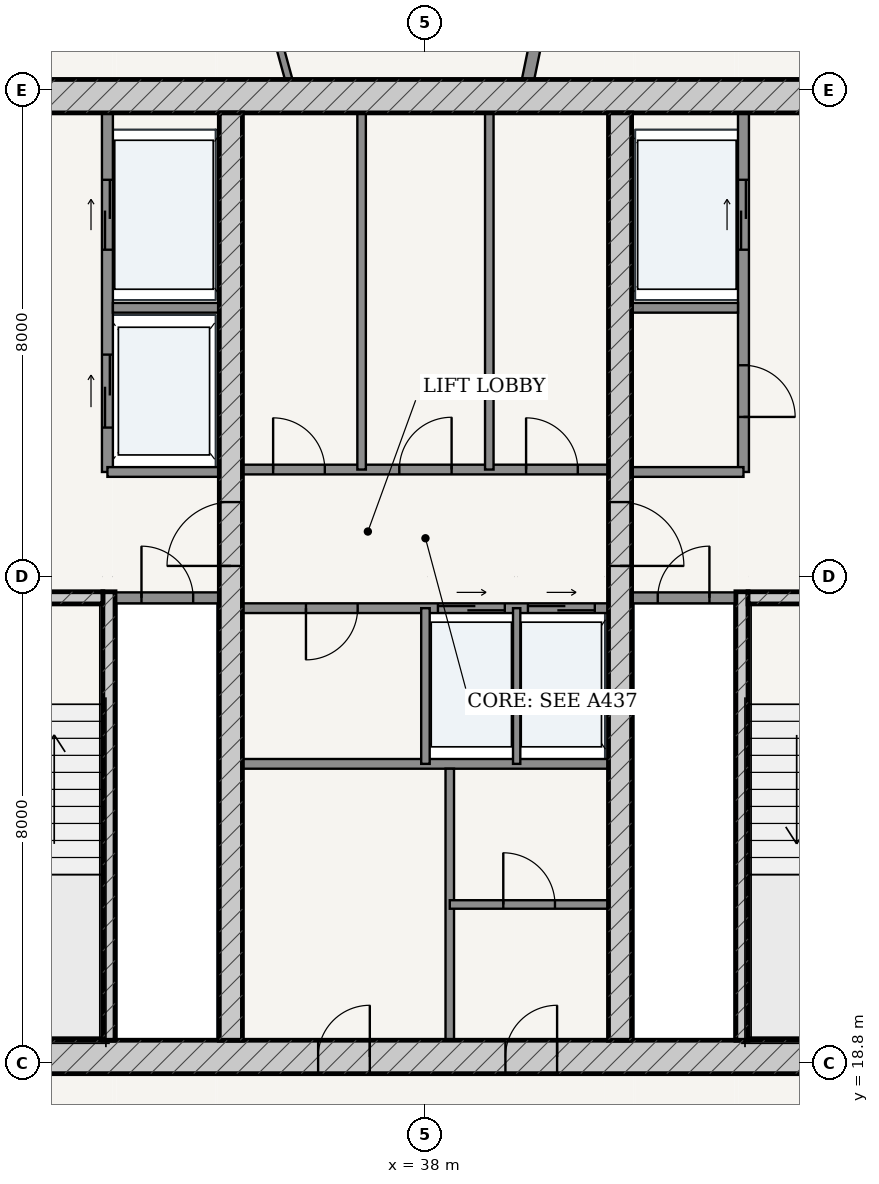
"""IFC4 building model, lengths in metres.
Left out: names, types, materials, properties, quantities, classifications, styles, units other than length and angle.
Written with IfcOpenShell. Run it as: python <this file> out.ifc"""

import sys

from ifc_helpers import new_model, si_unit, direction, frame, frame_2d, origin, place, context, subcontext, project, spatial, rectangle, extrude, source, transform, mapped, element, fill, save


model = new_model("IFC4")
c1 = context("Model", 3, precision=1e-05, world=origin(), true_north=direction((-0.2419218956, 0.970295726276)))
c2 = subcontext(c1, "Body", "Model", "MODEL_VIEW")
j1 = project(units=[si_unit("LENGTHUNIT", "METRE"), si_unit("PLANEANGLEUNIT", "RADIAN")], contexts=[c1])
p1 = place(None, origin())
s1 = spatial("IfcSite", under=j1, at=p1, CompositionType="ELEMENT")
p2 = place(p1, origin())
s2 = spatial("IfcBuilding", under=s1, at=p2, CompositionType="ELEMENT")
p3 = place(p2, frame((0.0, 0.0, 285.7)))
s3 = spatial("IfcBuildingStorey", under=s2, at=p3, CompositionType="ELEMENT", Elevation=285.7)
p4 = place(p3, frame((28.825, 18.9, 0.0), z_axis=(0.0, 0.0, 1.0), x_axis=(1.0, 0.0, 0.0)))
e1 = element("IfcWall", 1, at=p4, inside=s3, PredefinedType="SHEAR", context=c2, shape_type="SweptSolid", body=[
    extrude(rectangle(XDim=18.35, YDim=0.55, at=frame_2d((9.175, 0.0))), origin(), (0.0, 0.0, 1.0), 3.49),
])
p5 = place(p4, frame((7.41, 0.0, 0.0)))
e2 = element("IfcOpeningElement", 2, at=p5, cuts=e1, PredefinedType="OPENING", context=c2, shape_type="SweptSolid", body=[
    extrude(rectangle(XDim=0.85, YDim=2.1, at=frame_2d((0.425, 1.05))), frame((0.0, 0.285, 0.0), z_axis=(0.0, -1.0, 0.0), x_axis=(1.0, 0.0, 0.0)), (0.0, 0.0, 1.0), 0.57),
])
p6 = place(p4, frame((10.49, 0.0, 0.0)))
e3 = element("IfcOpeningElement", 3, at=p6, cuts=e1, PredefinedType="OPENING", context=c2, shape_type="SweptSolid", body=[
    extrude(rectangle(XDim=0.85, YDim=2.1, at=frame_2d((0.425, 1.05))), frame((0.0, 0.285, 0.0), z_axis=(0.0, -1.0, 0.0), x_axis=(1.0, 0.0, 0.0)), (0.0, 0.0, 1.0), 0.57),
])
p7 = place(p3, frame((28.825, 34.7, 0.0), z_axis=(0.0, 0.0, 1.0), x_axis=(1.0, 0.0, 0.0)))
e4 = element("IfcWall", 4, at=p7, inside=s3, PredefinedType="SHEAR", context=c2, shape_type="SweptSolid", body=[
    extrude(rectangle(XDim=18.35, YDim=0.55, at=frame_2d((9.175, 0.0))), origin(), (0.0, 0.0, 1.0), 3.49),
])
p8 = place(p3, frame((32.795, 19.175, 0.0), z_axis=(0.0, 0.0, 1.0), x_axis=(0.0, 1.0, 0.0)))
e5 = element("IfcWall", 5, at=p8, inside=s3, PredefinedType="SOLIDWALL", context=c2, shape_type="SweptSolid", body=[
    extrude(rectangle(XDim=7.375, YDim=0.2, at=frame_2d((3.688, 0.0))), origin(), (0.0, 0.0, 1.0), 3.49),
])
p9 = place(p3, frame((29.375, 26.45, 0.0), z_axis=(0.0, 0.0, 1.0), x_axis=(1.0, 0.0, 0.0)))
e6 = element("IfcWall", 6, at=p9, inside=s3, PredefinedType="SOLIDWALL", context=c2, shape_type="SweptSolid", body=[
    extrude(rectangle(XDim=3.32, YDim=0.2, at=frame_2d((1.66, 0.0))), origin(), (0.0, 0.0, 1.0), 3.49),
])
p10 = place(p9, frame((1.185, 0.0, 0.0)))
e7 = element("IfcOpeningElement", 7, at=p10, cuts=e6, PredefinedType="OPENING", context=c2, shape_type="SweptSolid", body=[
    extrude(rectangle(XDim=0.95, YDim=2.15, at=frame_2d((0.475, 1.075))), frame((0.0, 0.11, 0.0), z_axis=(0.0, -1.0, 0.0), x_axis=(1.0, 0.0, 0.0)), (0.0, 0.0, 1.0), 0.22),
])
p11 = place(p3, frame((43.205, 19.175, 0.0), z_axis=(0.0, 0.0, 1.0), x_axis=(0.0, 1.0, 0.0)))
e8 = element("IfcWall", 8, at=p11, inside=s3, PredefinedType="SOLIDWALL", context=c2, shape_type="SweptSolid", body=[
    extrude(rectangle(XDim=7.375, YDim=0.2, at=frame_2d((3.688, 0.0))), origin(), (0.0, 0.0, 1.0), 3.49),
])
p12 = place(p3, frame((43.305, 26.45, 0.0), z_axis=(0.0, 0.0, 1.0), x_axis=(1.0, 0.0, 0.0)))
e9 = element("IfcWall", 9, at=p12, inside=s3, PredefinedType="SOLIDWALL", context=c2, shape_type="SweptSolid", body=[
    extrude(rectangle(XDim=3.32, YDim=0.2, at=frame_2d((1.66, 0.0))), origin(), (0.0, 0.0, 1.0), 3.49),
])
p13 = place(p12, frame((1.185, 0.0, 0.0)))
e10 = element("IfcOpeningElement", 10, at=p13, cuts=e9, PredefinedType="OPENING", context=c2, shape_type="SweptSolid", body=[
    extrude(rectangle(XDim=0.95, YDim=2.15, at=frame_2d((0.475, 1.075))), frame((0.0, 0.11, 0.0), z_axis=(0.0, -1.0, 0.0), x_axis=(1.0, 0.0, 0.0)), (0.0, 0.0, 1.0), 0.22),
])
p14 = place(p3, frame((34.8, 19.175, 0.0), z_axis=(0.0, 0.0, 1.0), x_axis=(0.0, 1.0, 0.0)))
e11 = element("IfcWall", 11, at=p14, inside=s3, PredefinedType="SHEAR", context=c2, shape_type="SweptSolid", body=[
    extrude(rectangle(XDim=15.25, YDim=0.38, at=frame_2d((7.625, 0.0))), origin(), (0.0, 0.0, 1.0), 3.49),
])
p15 = place(p14, frame((7.8, 0.0, 0.0)))
e12 = element("IfcOpeningElement", 12, at=p15, cuts=e11, PredefinedType="OPENING", context=c2, shape_type="SweptSolid", body=[
    extrude(rectangle(XDim=1.05, YDim=2.15, at=frame_2d((0.525, 1.075))), frame((0.0, 0.2, 0.0), z_axis=(0.0, -1.0, 0.0), x_axis=(1.0, 0.0, 0.0)), (0.0, 0.0, 1.0), 0.4),
])
p16 = place(p3, frame((41.2, 19.175, 0.0), z_axis=(0.0, 0.0, 1.0), x_axis=(0.0, 1.0, 0.0)))
e13 = element("IfcWall", 13, at=p16, inside=s3, PredefinedType="SHEAR", context=c2, shape_type="SweptSolid", body=[
    extrude(rectangle(XDim=15.25, YDim=0.38, at=frame_2d((7.625, 0.0))), origin(), (0.0, 0.0, 1.0), 3.49),
])
p17 = place(p16, frame((7.8, 0.0, 0.0)))
e14 = element("IfcOpeningElement", 14, at=p17, cuts=e13, PredefinedType="OPENING", context=c2, shape_type="SweptSolid", body=[
    extrude(rectangle(XDim=1.05, YDim=2.15, at=frame_2d((0.525, 1.075))), frame((0.0, 0.2, 0.0), z_axis=(0.0, -1.0, 0.0), x_axis=(1.0, 0.0, 0.0)), (0.0, 0.0, 1.0), 0.4),
])
p18 = place(p3, frame((32.9, 26.45, 0.0), z_axis=(0.0, 0.0, 1.0), x_axis=(1.0, 0.0, 0.0)))
e15 = element("IfcWall", 15, at=p18, inside=s3, PredefinedType="PARTITIONING", context=c2, shape_type="SweptSolid", body=[
    extrude(rectangle(XDim=1.71, YDim=0.18, at=frame_2d((0.855, 0.0))), origin(), (0.0, 0.0, 1.0), 3.49),
])
p19 = place(p18, frame((0.43, 0.0, 0.0)))
e16 = element("IfcOpeningElement", 16, at=p19, cuts=e15, PredefinedType="OPENING", context=c2, shape_type="SweptSolid", body=[
    extrude(rectangle(XDim=0.85, YDim=2.1, at=frame_2d((0.425, 1.05))), frame((0.0, 0.1, 0.0), z_axis=(0.0, -1.0, 0.0), x_axis=(1.0, 0.0, 0.0)), (0.0, 0.0, 1.0), 0.2),
])
p20 = place(p3, frame((41.39, 26.45, 0.0), z_axis=(0.0, 0.0, 1.0), x_axis=(1.0, 0.0, 0.0)))
e17 = element("IfcWall", 17, at=p20, inside=s3, PredefinedType="PARTITIONING", context=c2, shape_type="SweptSolid", body=[
    extrude(rectangle(XDim=1.71, YDim=0.18, at=frame_2d((0.855, 0.0))), origin(), (0.0, 0.0, 1.0), 3.49),
])
p21 = place(p20, frame((0.43, 0.0, 0.0)))
e18 = element("IfcOpeningElement", 18, at=p21, cuts=e17, PredefinedType="OPENING", context=c2, shape_type="SweptSolid", body=[
    extrude(rectangle(XDim=0.85, YDim=2.1, at=frame_2d((0.425, 1.05))), frame((0.0, 0.1, 0.0), z_axis=(0.0, -1.0, 0.0), x_axis=(1.0, 0.0, 0.0)), (0.0, 0.0, 1.0), 0.2),
])
p22 = place(p3, frame((32.77, 28.52, 0.0), z_axis=(0.0, 0.0, 1.0), x_axis=(0.0, 1.0, 0.0)))
e19 = element("IfcWall", 19, at=p22, inside=s3, PredefinedType="PARTITIONING", context=c2, shape_type="SweptSolid", body=[
    extrude(rectangle(XDim=5.905, YDim=0.18, at=frame_2d((2.953, 0.0))), origin(), (0.0, 0.0, 1.0), 3.49),
])
p23 = place(p22, frame((3.655, 0.0, 0.0)))
e20 = element("IfcOpeningElement", 20, at=p23, cuts=e19, PredefinedType="OPENING", context=c2, shape_type="SweptSolid", body=[
    extrude(rectangle(XDim=1.15, YDim=2.2, at=frame_2d((0.575, 1.1))), frame((0.0, 0.1, 0.0), z_axis=(0.0, -1.0, 0.0), x_axis=(1.0, 0.0, 0.0)), (0.0, 0.0, 1.0), 0.2),
])
p24 = place(p22, frame((0.73, 0.0, 0.0)))
e21 = element("IfcOpeningElement", 21, at=p24, cuts=e19, PredefinedType="OPENING", context=c2, shape_type="SweptSolid", body=[
    extrude(rectangle(XDim=1.2, YDim=2.25, at=frame_2d((0.6, 1.125))), frame((0.0, 0.1, 0.0), z_axis=(0.0, -1.0, 0.0), x_axis=(1.0, 0.0, 0.0)), (0.0, 0.0, 1.0), 0.2),
])
p25 = place(p3, frame((32.86, 31.22, 0.0), z_axis=(0.0, 0.0, 1.0), x_axis=(1.0, 0.0, 0.0)))
e22 = element("IfcWall", 22, at=p25, inside=s3, PredefinedType="PARTITIONING", context=c2, shape_type="SweptSolid", body=[
    extrude(rectangle(XDim=1.75, YDim=0.16, at=frame_2d((0.875, 0.0))), origin(), (0.0, 0.0, 1.0), 3.49),
])
p26 = place(p3, frame((32.77, 28.52, 0.0), z_axis=(0.0, 0.0, 1.0), x_axis=(1.0, 0.0, 0.0)))
e23 = element("IfcWall", 23, at=p26, inside=s3, PredefinedType="PARTITIONING", context=c2, shape_type="SweptSolid", body=[
    extrude(rectangle(XDim=1.84, YDim=0.16, at=frame_2d((0.92, 0.0))), origin(), (0.0, 0.0, 1.0), 3.49),
])
p27 = place(p3, frame((43.23, 28.52, 0.0), z_axis=(0.0, 0.0, 1.0), x_axis=(0.0, 1.0, 0.0)))
e24 = element("IfcWall", 24, at=p27, inside=s3, PredefinedType="PARTITIONING", context=c2, shape_type="SweptSolid", body=[
    extrude(rectangle(XDim=5.905, YDim=0.18, at=frame_2d((2.953, 0.0))), origin(), (0.0, 0.0, 1.0), 3.49),
])
p28 = place(p27, frame((0.905, 0.0, 0.0)))
e25 = element("IfcOpeningElement", 25, at=p28, cuts=e24, PredefinedType="OPENING", context=c2, shape_type="SweptSolid", body=[
    extrude(rectangle(XDim=0.85, YDim=2.1, at=frame_2d((0.425, 1.05))), frame((0.0, 0.1, 0.0), z_axis=(0.0, -1.0, 0.0), x_axis=(1.0, 0.0, 0.0)), (0.0, 0.0, 1.0), 0.2),
])
p29 = place(p27, frame((3.655, 0.0, 0.0)))
e26 = element("IfcOpeningElement", 26, at=p29, cuts=e24, PredefinedType="OPENING", context=c2, shape_type="SweptSolid", body=[
    extrude(rectangle(XDim=1.15, YDim=2.2, at=frame_2d((0.575, 1.1))), frame((0.0, 0.1, 0.0), z_axis=(0.0, -1.0, 0.0), x_axis=(1.0, 0.0, 0.0)), (0.0, 0.0, 1.0), 0.2),
])
p30 = place(p3, frame((41.39, 31.22, 0.0), z_axis=(0.0, 0.0, 1.0), x_axis=(1.0, 0.0, 0.0)))
e27 = element("IfcWall", 27, at=p30, inside=s3, PredefinedType="PARTITIONING", context=c2, shape_type="SweptSolid", body=[
    extrude(rectangle(XDim=1.75, YDim=0.16, at=frame_2d((0.875, 0.0))), origin(), (0.0, 0.0, 1.0), 3.49),
])
p31 = place(p3, frame((41.39, 28.52, 0.0), z_axis=(0.0, 0.0, 1.0), x_axis=(1.0, 0.0, 0.0)))
e28 = element("IfcWall", 28, at=p31, inside=s3, PredefinedType="PARTITIONING", context=c2, shape_type="SweptSolid", body=[
    extrude(rectangle(XDim=1.84, YDim=0.16, at=frame_2d((0.92, 0.0))), origin(), (0.0, 0.0, 1.0), 3.49),
])
p32 = place(p3, frame((34.99, 28.56, 0.0), z_axis=(0.0, 0.0, 1.0), x_axis=(1.0, 0.0, 0.0)))
e29 = element("IfcWall", 29, at=p32, inside=s3, PredefinedType="PARTITIONING", context=c2, shape_type="SweptSolid", body=[
    extrude(rectangle(XDim=6.02, YDim=0.16, at=frame_2d((3.01, 0.0))), origin(), (0.0, 0.0, 1.0), 3.49),
])
p33 = place(p32, frame((0.505, 0.0, 0.0)))
e30 = element("IfcOpeningElement", 30, at=p33, cuts=e29, PredefinedType="OPENING", context=c2, shape_type="SweptSolid", body=[
    extrude(rectangle(XDim=0.85, YDim=2.1, at=frame_2d((0.425, 1.05))), frame((0.0, 0.09, 0.0), z_axis=(0.0, -1.0, 0.0), x_axis=(1.0, 0.0, 0.0)), (0.0, 0.0, 1.0), 0.18),
])
p34 = place(p32, frame((2.58, 0.0, 0.0)))
e31 = element("IfcOpeningElement", 31, at=p34, cuts=e29, PredefinedType="OPENING", context=c2, shape_type="SweptSolid", body=[
    extrude(rectangle(XDim=0.86, YDim=2.1, at=frame_2d((0.43, 1.05))), frame((0.0, 0.09, 0.0), z_axis=(0.0, -1.0, 0.0), x_axis=(1.0, 0.0, 0.0)), (0.0, 0.0, 1.0), 0.18),
])
p35 = place(p32, frame((4.665, 0.0, 0.0)))
e32 = element("IfcOpeningElement", 32, at=p35, cuts=e29, PredefinedType="OPENING", context=c2, shape_type="SweptSolid", body=[
    extrude(rectangle(XDim=0.85, YDim=2.1, at=frame_2d((0.425, 1.05))), frame((0.0, 0.09, 0.0), z_axis=(0.0, -1.0, 0.0), x_axis=(1.0, 0.0, 0.0)), (0.0, 0.0, 1.0), 0.18),
])
for number, where, z_axis, x_axis in (
    (33, (36.95, 28.56, 0.0), (0.0, 0.0, 1.0), (0.0, 1.0, 0.0)),
    (34, (39.05, 28.56, 0.0), (0.0, 0.0, 1.0), (0.0, 1.0, 0.0)),
):
    element("IfcWall", number, at=place(p3, frame(where, z_axis=z_axis, x_axis=x_axis)), inside=s3, PredefinedType="PARTITIONING", context=c2, shape_type="SweptSolid", body=[
        extrude(rectangle(XDim=5.865, YDim=0.14, at=frame_2d((2.933, 0.0))), origin(), (0.0, 0.0, 1.0), 3.49),
    ])
p36 = place(p3, frame((34.99, 26.28, 0.0), z_axis=(0.0, 0.0, 1.0), x_axis=(1.0, 0.0, 0.0)))
e35 = element("IfcWall", 35, at=p36, inside=s3, PredefinedType="PARTITIONING", context=c2, shape_type="SweptSolid", body=[
    extrude(rectangle(XDim=6.02, YDim=0.16, at=frame_2d((3.01, 0.0))), origin(), (0.0, 0.0, 1.0), 3.49),
])
p37 = place(p36, frame((1.045, 0.0, 0.0)))
e36 = element("IfcOpeningElement", 36, at=p37, cuts=e35, PredefinedType="OPENING", context=c2, shape_type="SweptSolid", body=[
    extrude(rectangle(XDim=0.85, YDim=2.1, at=frame_2d((0.425, 1.05))), frame((0.0, 0.09, 0.0), z_axis=(0.0, -1.0, 0.0), x_axis=(1.0, 0.0, 0.0)), (0.0, 0.0, 1.0), 0.18),
])
p38 = place(p36, frame((3.215, 0.0, 0.0)))
e37 = element("IfcOpeningElement", 37, at=p38, cuts=e35, PredefinedType="OPENING", context=c2, shape_type="SweptSolid", body=[
    extrude(rectangle(XDim=1.1, YDim=2.2, at=frame_2d((0.55, 1.1))), frame((0.0, 0.09, 0.0), z_axis=(0.0, -1.0, 0.0), x_axis=(1.0, 0.0, 0.0)), (0.0, 0.0, 1.0), 0.18),
])
p39 = place(p36, frame((4.695, 0.0, 0.0)))
e38 = element("IfcOpeningElement", 38, at=p39, cuts=e35, PredefinedType="OPENING", context=c2, shape_type="SweptSolid", body=[
    extrude(rectangle(XDim=1.1, YDim=2.2, at=frame_2d((0.55, 1.1))), frame((0.0, 0.09, 0.0), z_axis=(0.0, -1.0, 0.0), x_axis=(1.0, 0.0, 0.0)), (0.0, 0.0, 1.0), 0.18),
])
p40 = place(p3, frame((34.99, 23.72, 0.0), z_axis=(0.0, 0.0, 1.0), x_axis=(1.0, 0.0, 0.0)))
e39 = element("IfcWall", 39, at=p40, inside=s3, PredefinedType="PARTITIONING", context=c2, shape_type="SweptSolid", body=[
    extrude(rectangle(XDim=6.02, YDim=0.16, at=frame_2d((3.01, 0.0))), origin(), (0.0, 0.0, 1.0), 3.49),
])
p41 = place(p3, frame((38.0, 23.72, 0.0), z_axis=(0.0, 0.0, 1.0), x_axis=(0.0, 1.0, 0.0)))
e40 = element("IfcWall", 40, at=p41, inside=s3, PredefinedType="PARTITIONING", context=c2, shape_type="SweptSolid", body=[
    extrude(rectangle(XDim=2.56, YDim=0.14, at=frame_2d((1.28, 0.0))), origin(), (0.0, 0.0, 1.0), 3.49),
])
p42 = place(p3, frame((39.5, 23.72, 0.0), z_axis=(0.0, 0.0, 1.0), x_axis=(0.0, 1.0, 0.0)))
e41 = element("IfcWall", 41, at=p42, inside=s3, PredefinedType="PARTITIONING", context=c2, shape_type="SweptSolid", body=[
    extrude(rectangle(XDim=2.56, YDim=0.12, at=frame_2d((1.28, 0.0))), origin(), (0.0, 0.0, 1.0), 3.49),
])
p43 = place(p3, frame((38.4, 19.175, 0.0), z_axis=(0.0, 0.0, 1.0), x_axis=(0.0, 1.0, 0.0)))
e42 = element("IfcWall", 42, at=p43, inside=s3, PredefinedType="PARTITIONING", context=c2, shape_type="SweptSolid", body=[
    extrude(rectangle(XDim=4.465, YDim=0.14, at=frame_2d((2.232, 0.0))), origin(), (0.0, 0.0, 1.0), 3.49),
])
p44 = place(p3, frame((38.4, 21.407, 0.0), z_axis=(0.0, 0.0, 1.0), x_axis=(1.0, 0.0, 0.0)))
e43 = element("IfcWall", 43, at=p44, inside=s3, PredefinedType="PARTITIONING", context=c2, shape_type="SweptSolid", body=[
    extrude(rectangle(XDim=2.61, YDim=0.14, at=frame_2d((1.305, 0.0))), origin(), (0.0, 0.0, 1.0), 3.49),
])
p45 = place(p44, frame((0.88, 0.0, 0.0)))
e44 = element("IfcOpeningElement", 44, at=p45, cuts=e43, PredefinedType="OPENING", context=c2, shape_type="SweptSolid", body=[
    extrude(rectangle(XDim=0.85, YDim=2.1, at=frame_2d((0.425, 1.05))), frame((0.0, 0.08, 0.0), z_axis=(0.0, -1.0, 0.0), x_axis=(1.0, 0.0, 0.0)), (0.0, 0.0, 1.0), 0.16),
])
p46 = place(p3, frame((39.688, 34.977, 0.0), z_axis=(0.0, 0.0, 1.0), x_axis=(0.202091890364, 0.979366564596, 0.0)))
e45 = element("IfcWall", 45, at=p46, inside=s3, PredefinedType="PARTITIONING", context=c2, shape_type="SweptSolid", body=[
    extrude(rectangle(XDim=10.278, YDim=0.2, at=frame_2d((5.139, 0.0))), origin(), (0.0, 0.0, 1.0), 2.575),
])
p47 = place(p3, frame((35.751, 34.977, 0.0), z_axis=(0.0, 0.0, 1.0), x_axis=(-0.26521778697, 0.964188532122, 0.0)))
e46 = element("IfcWall", 46, at=p47, inside=s3, PredefinedType="PARTITIONING", context=c2, shape_type="SweptSolid", body=[
    extrude(rectangle(XDim=2.684, YDim=0.12, at=frame_2d((1.342, 0.0))), origin(), (0.0, 0.0, 1.0), 2.575),
])
m1 = source(origin(), c2, "Body", "SweptSolid", [
    extrude(rectangle(XDim=1.05, YDim=2.15, at=frame_2d((0.525, 1.075))), frame((0.0, 0.025, 0.0), z_axis=(0.0, -1.0, 0.0), x_axis=(1.0, 0.0, 0.0)), (0.0, 0.0, 1.0), 0.05),
])
p48 = place(p15, origin())
e47 = element("IfcDoor", 47, at=p48, inside=s3, OperationType="SINGLE_SWING_LEFT", PredefinedType="DOOR", context=c2, shape_type="MappedRepresentation", body=[
    mapped(m1, transform((0.0, 0.0, 0.0), scale=1.0)),
])
fill(e12, e47)
p49 = place(p17, frame((1.05, 0.0, 0.0), z_axis=(0.0, 0.0, 1.0), x_axis=(-1.0, 0.0, 0.0)))
e48 = element("IfcDoor", 48, at=p49, inside=s3, OperationType="SINGLE_SWING_RIGHT", PredefinedType="DOOR", context=c2, shape_type="MappedRepresentation", body=[
    mapped(m1, transform((0.0, 0.0, 0.0), scale=1.0)),
])
fill(e14, e48)
m2 = source(origin(), c2, "Body", "SweptSolid", [
    extrude(rectangle(XDim=0.85, YDim=2.1, at=frame_2d((0.425, 1.05))), frame((0.0, 0.025, 0.0), z_axis=(0.0, -1.0, 0.0), x_axis=(1.0, 0.0, 0.0)), (0.0, 0.0, 1.0), 0.05),
])
p50 = place(p19, origin())
e49 = element("IfcDoor", 49, at=p50, inside=s3, OperationType="SINGLE_SWING_LEFT", PredefinedType="DOOR", context=c2, shape_type="MappedRepresentation", body=[
    mapped(m2, transform((0.0, 0.0, 0.0), scale=1.0)),
])
fill(e16, e49)
p51 = place(p21, origin())
e50 = element("IfcDoor", 50, at=p51, inside=s3, OperationType="SINGLE_SWING_RIGHT", PredefinedType="DOOR", context=c2, shape_type="MappedRepresentation", body=[
    mapped(m2, transform((0.0, 0.0, 0.0), scale=1.0)),
])
fill(e18, e50)
p52 = place(p28, frame((0.85, 0.0, 0.0), z_axis=(0.0, 0.0, 1.0), x_axis=(-1.0, 0.0, 0.0)))
e51 = element("IfcDoor", 51, at=p52, inside=s3, OperationType="SINGLE_SWING_RIGHT", PredefinedType="DOOR", context=c2, shape_type="MappedRepresentation", body=[
    mapped(m2, transform((0.0, 0.0, 0.0), scale=1.0)),
])
fill(e25, e51)
p53 = place(p33, origin())
e52 = element("IfcDoor", 52, at=p53, inside=s3, OperationType="SINGLE_SWING_LEFT", PredefinedType="DOOR", context=c2, shape_type="MappedRepresentation", body=[
    mapped(m2, transform((0.0, 0.0, 0.0), scale=1.0)),
])
fill(e30, e52)
m3 = source(origin(), c2, "Body", "SweptSolid", [
    extrude(rectangle(XDim=0.86, YDim=2.1, at=frame_2d((0.43, 1.05))), frame((0.0, 0.025, 0.0), z_axis=(0.0, -1.0, 0.0), x_axis=(1.0, 0.0, 0.0)), (0.0, 0.0, 1.0), 0.05),
])
p54 = place(p34, origin())
e53 = element("IfcDoor", 53, at=p54, inside=s3, OperationType="SINGLE_SWING_RIGHT", PredefinedType="DOOR", context=c2, shape_type="MappedRepresentation", body=[
    mapped(m3, transform((0.0, 0.0, 0.0), scale=1.0)),
])
fill(e31, e53)
p55 = place(p35, origin())
e54 = element("IfcDoor", 54, at=p55, inside=s3, OperationType="SINGLE_SWING_LEFT", PredefinedType="DOOR", context=c2, shape_type="MappedRepresentation", body=[
    mapped(m2, transform((0.0, 0.0, 0.0), scale=1.0)),
])
fill(e32, e54)
p56 = place(p37, frame((0.85, 0.0, 0.0), z_axis=(0.0, 0.0, 1.0), x_axis=(-1.0, 0.0, 0.0)))
e55 = element("IfcDoor", 55, at=p56, inside=s3, OperationType="SINGLE_SWING_RIGHT", PredefinedType="DOOR", context=c2, shape_type="MappedRepresentation", body=[
    mapped(m2, transform((0.0, 0.0, 0.0), scale=1.0)),
])
fill(e36, e55)
p57 = place(p5, origin())
e56 = element("IfcDoor", 56, at=p57, inside=s3, OperationType="SINGLE_SWING_RIGHT", PredefinedType="DOOR", context=c2, shape_type="MappedRepresentation", body=[
    mapped(m2, transform((0.0, 0.0, 0.0), scale=1.0)),
])
fill(e2, e56)
p58 = place(p6, origin())
e57 = element("IfcDoor", 57, at=p58, inside=s3, OperationType="SINGLE_SWING_RIGHT", PredefinedType="DOOR", context=c2, shape_type="MappedRepresentation", body=[
    mapped(m2, transform((0.0, 0.0, 0.0), scale=1.0)),
])
fill(e3, e57)
p59 = place(p45, origin())
e58 = element("IfcDoor", 58, at=p59, inside=s3, OperationType="SINGLE_SWING_LEFT", PredefinedType="DOOR", context=c2, shape_type="MappedRepresentation", body=[
    mapped(m2, transform((0.0, 0.0, 0.0), scale=1.0)),
])
fill(e44, e58)
m4 = source(origin(), c2, "Body", "SweptSolid", [
    extrude(rectangle(XDim=1.15, YDim=2.2, at=frame_2d((0.575, 1.1))), frame((0.0, 0.025, 0.0), z_axis=(0.0, -1.0, 0.0), x_axis=(1.0, 0.0, 0.0)), (0.0, 0.0, 1.0), 0.05),
])
p60 = place(p23, origin())
e59 = element("IfcDoor", 59, at=p60, inside=s3, OperationType="DOUBLE_DOOR_SLIDING", PredefinedType="DOOR", context=c2, shape_type="MappedRepresentation", body=[
    mapped(m4, transform((0.0, 0.0, 0.0), scale=1.0)),
])
fill(e20, e59)
p61 = place(p29, origin())
e60 = element("IfcDoor", 60, at=p61, inside=s3, OperationType="DOUBLE_DOOR_SLIDING", PredefinedType="DOOR", context=c2, shape_type="MappedRepresentation", body=[
    mapped(m4, transform((0.0, 0.0, 0.0), scale=1.0)),
])
fill(e26, e60)
m5 = source(origin(), c2, "Body", "SweptSolid", [
    extrude(rectangle(XDim=1.2, YDim=2.25, at=frame_2d((0.6, 1.125))), frame((0.0, 0.025, 0.0), z_axis=(0.0, -1.0, 0.0), x_axis=(1.0, 0.0, 0.0)), (0.0, 0.0, 1.0), 0.05),
])
p62 = place(p24, origin())
e61 = element("IfcDoor", 61, at=p62, inside=s3, OperationType="DOUBLE_DOOR_SLIDING", PredefinedType="DOOR", context=c2, shape_type="MappedRepresentation", body=[
    mapped(m5, transform((0.0, 0.0, 0.0), scale=1.0)),
])
fill(e21, e61)
m6 = source(origin(), c2, "Body", "SweptSolid", [
    extrude(rectangle(XDim=1.1, YDim=2.2, at=frame_2d((0.55, 1.1))), frame((0.0, 0.025, 0.0), z_axis=(0.0, -1.0, 0.0), x_axis=(1.0, 0.0, 0.0)), (0.0, 0.0, 1.0), 0.05),
])
p63 = place(p38, origin())
e62 = element("IfcDoor", 62, at=p63, inside=s3, OperationType="DOUBLE_DOOR_SLIDING", PredefinedType="DOOR", context=c2, shape_type="MappedRepresentation", body=[
    mapped(m6, transform((0.0, 0.0, 0.0), scale=1.0)),
])
fill(e37, e62)
p64 = place(p39, origin())
e63 = element("IfcDoor", 63, at=p64, inside=s3, OperationType="DOUBLE_DOOR_SLIDING", PredefinedType="DOOR", context=c2, shape_type="MappedRepresentation", body=[
    mapped(m6, transform((0.0, 0.0, 0.0), scale=1.0)),
])
fill(e38, e63)
save(model, sys.argv[1])
